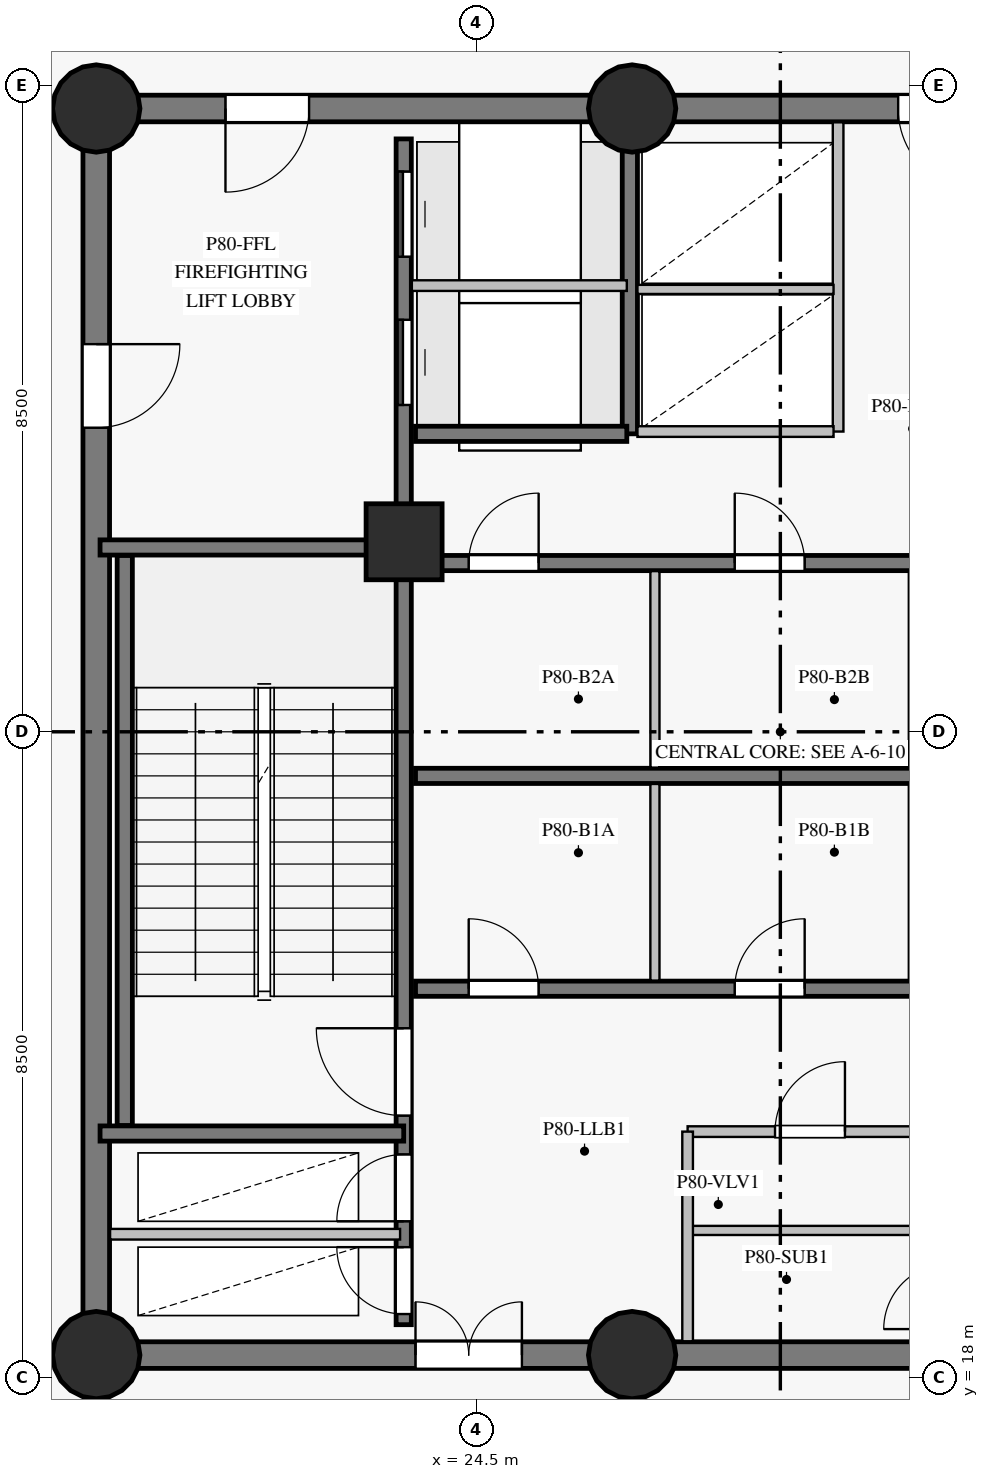
"""IFC4 building model, lengths in metres.
Left out: names, types, materials, properties, quantities, classifications, styles, units other than length and angle.
Written with IfcOpenShell. Run it as: python <this file> out.ifc"""

import sys

from ifc_helpers import new_model, si_unit, direction, frame, frame_2d, origin, origin_with_axes, origin_2d, place, context, subcontext, project, spatial, rectangle, circle, extrude, source, transform, mapped, element, fill, save


model = new_model("IFC4")
c1 = context("Model", 3, precision=1e-05, world=origin(), true_north=direction((0.0, 1.0)))
c2 = subcontext(c1, "Body", "Model", "MODEL_VIEW")
j1 = project(units=[si_unit("LENGTHUNIT", "METRE"), si_unit("PLANEANGLEUNIT", "RADIAN")], contexts=[c1])
p1 = place(None, origin())
s1 = spatial("IfcSite", under=j1, at=p1, CompositionType="ELEMENT")
p2 = place(p1, origin())
s2 = spatial("IfcBuilding", under=s1, at=p2, CompositionType="ELEMENT")
p3 = place(p2, frame((0.0, 0.0, 268.75)))
s3 = spatial("IfcBuildingStorey", under=s2, at=p3, CompositionType="ELEMENT", Elevation=268.75)
p4 = place(p3, frame((19.5, 18.3, 0.0), z_axis=(0.0, 0.0, 1.0), x_axis=(1.0, 0.0, 0.0)))
e1 = element("IfcWall", 1, at=p4, inside=s3, PredefinedType="SHEAR", context=c2, shape_type="SweptSolid", body=[
    extrude(rectangle(XDim=7.05, YDim=0.35, at=frame_2d((3.525, 0.0))), origin(), (0.0, 0.0, 1.0), 4.375),
])
p5 = place(p4, frame((4.2, 0.0, 0.0)))
e2 = element("IfcOpeningElement", 2, at=p5, cuts=e1, PredefinedType="OPENING", context=c2, shape_type="SweptSolid", body=[
    extrude(rectangle(XDim=1.4, YDim=2.2, at=frame_2d((0.7, 1.1))), frame((0.0, 0.185, 0.0), z_axis=(0.0, -1.0, 0.0), x_axis=(1.0, 0.0, 0.0)), (0.0, 0.0, 1.0), 0.37),
])
p6 = place(p3, frame((26.55, 18.3, 0.0), z_axis=(0.0, 0.0, 1.0), x_axis=(1.0, 0.0, 0.0)))
e3 = element("IfcWall", 3, at=p6, inside=s3, PredefinedType="SHEAR", context=c2, shape_type="SweptSolid", body=[
    extrude(rectangle(XDim=10.95, YDim=0.35, at=frame_2d((5.475, 0.0))), origin(), (0.0, 0.0, 1.0), 4.375),
])
p7 = place(p6, frame((4.55, 0.0, 0.0)))
e4 = element("IfcOpeningElement", 4, at=p7, cuts=e3, PredefinedType="OPENING", context=c2, shape_type="SweptSolid", body=[
    extrude(rectangle(XDim=1.4, YDim=2.2, at=frame_2d((0.7, 1.1))), frame((0.0, 0.185, 0.0), z_axis=(0.0, -1.0, 0.0), x_axis=(1.0, 0.0, 0.0)), (0.0, 0.0, 1.0), 0.37),
])
p8 = place(p3, frame((37.5, 34.7, 0.0), z_axis=(0.0, 0.0, 1.0), x_axis=(-1.0, 0.0, 0.0)))
e5 = element("IfcWall", 5, at=p8, inside=s3, PredefinedType="SHEAR", context=c2, shape_type="SweptSolid", body=[
    extrude(rectangle(XDim=10.95, YDim=0.35, at=frame_2d((5.475, 0.0))), origin(), (0.0, 0.0, 1.0), 4.375),
])
p9 = place(p8, frame((2.15, 0.0, 0.0)))
e6 = element("IfcOpeningElement", 6, at=p9, cuts=e5, PredefinedType="OPENING", context=c2, shape_type="SweptSolid", body=[
    extrude(rectangle(XDim=1.2, YDim=2.15, at=frame_2d((0.6, 1.075))), frame((0.0, 0.185, 0.0), z_axis=(0.0, -1.0, 0.0), x_axis=(1.0, 0.0, 0.0)), (0.0, 0.0, 1.0), 0.37),
])
p10 = place(p8, frame((6.35, 0.0, 0.0)))
e7 = element("IfcOpeningElement", 7, at=p10, cuts=e5, PredefinedType="OPENING", context=c2, shape_type="SweptSolid", body=[
    extrude(rectangle(XDim=1.1, YDim=2.15, at=frame_2d((0.55, 1.075))), frame((0.0, 0.185, 0.0), z_axis=(0.0, -1.0, 0.0), x_axis=(1.0, 0.0, 0.0)), (0.0, 0.0, 1.0), 0.37),
])
p11 = place(p3, frame((26.55, 34.7, 0.0), z_axis=(0.0, 0.0, 1.0), x_axis=(-1.0, 0.0, 0.0)))
e8 = element("IfcWall", 8, at=p11, inside=s3, PredefinedType="SHEAR", context=c2, shape_type="SweptSolid", body=[
    extrude(rectangle(XDim=7.05, YDim=0.35, at=frame_2d((3.525, 0.0))), origin(), (0.0, 0.0, 1.0), 4.375),
])
p12 = place(p11, frame((4.25, 0.0, 0.0)))
e9 = element("IfcOpeningElement", 9, at=p12, cuts=e8, PredefinedType="OPENING", context=c2, shape_type="SweptSolid", body=[
    extrude(rectangle(XDim=1.1, YDim=2.15, at=frame_2d((0.55, 1.075))), frame((0.0, 0.185, 0.0), z_axis=(0.0, -1.0, 0.0), x_axis=(1.0, 0.0, 0.0)), (0.0, 0.0, 1.0), 0.37),
])
p13 = place(p3, frame((19.5, 34.7, 0.0), z_axis=(0.0, 0.0, 1.0), x_axis=(0.0, -1.0, 0.0)))
e10 = element("IfcWall", 10, at=p13, inside=s3, PredefinedType="SHEAR", context=c2, shape_type="SweptSolid", body=[
    extrude(rectangle(XDim=16.4, YDim=0.35, at=frame_2d((8.2, 0.0))), origin(), (0.0, 0.0, 1.0), 4.375),
])
p14 = place(p13, frame((3.1, 0.0, 0.0)))
e11 = element("IfcOpeningElement", 11, at=p14, cuts=e10, PredefinedType="OPENING", context=c2, shape_type="SweptSolid", body=[
    extrude(rectangle(XDim=1.1, YDim=2.15, at=frame_2d((0.55, 1.075))), frame((0.0, 0.185, 0.0), z_axis=(0.0, -1.0, 0.0), x_axis=(1.0, 0.0, 0.0)), (0.0, 0.0, 1.0), 0.37),
])
m1 = source(origin_with_axes(), c2, "Body", "SweptSolid", [
    extrude(circle(Radius=0.575, at=origin_2d()), origin(), (0.0, 0.0, 1.0), 4.65),
])
for number, where, z_axis, x_axis in (
    (12, (19.5, 18.3, 0.0), (0.0, 0.0, 1.0), (1.0, 0.0, 0.0)),
    (13, (26.55, 18.3, 0.0), (0.0, 0.0, 1.0), (1.0, 0.0, 0.0)),
    (14, (19.5, 34.7, 0.0), (0.0, 0.0, 1.0), (1.0, 0.0, 0.0)),
    (15, (26.55, 34.7, 0.0), (0.0, 0.0, 1.0), (1.0, 0.0, 0.0)),
):
    element("IfcColumn", number, at=place(p3, frame(where, z_axis=z_axis, x_axis=x_axis)), inside=s3, PredefinedType="COLUMN", context=c2, shape_type="MappedRepresentation", body=[
        mapped(m1, transform((0.0, 0.0, 0.0), scale=1.0)),
    ])
m2 = source(origin_with_axes(), c2, "Body", "SweptSolid", [
    extrude(rectangle(XDim=1.0, YDim=1.0, at=origin_2d()), origin(), (0.0, 0.0, 1.0), 4.65),
])
p15 = place(p3, frame((23.55, 29.0, 0.0), z_axis=(0.0, 0.0, 1.0), x_axis=(1.0, 0.0, 0.0)))
e16 = element("IfcColumn", 16, at=p15, inside=s3, PredefinedType="COLUMN", context=c2, shape_type="MappedRepresentation", body=[
    mapped(m2, transform((0.0, 0.0, 0.0), scale=1.0)),
])
p16 = place(p3, frame((23.545, 18.7, 0.0), z_axis=(0.0, 0.0, 1.0), x_axis=(0.0, 1.0, 0.0)))
e17 = element("IfcWall", 17, at=p16, inside=s3, PredefinedType="SHEAR", context=c2, shape_type="SweptSolid", body=[
    extrude(rectangle(XDim=15.6, YDim=0.2, at=frame_2d((7.8, 0.0))), origin(), (0.0, 0.0, 1.0), 4.375),
])
p17 = place(p16, frame((2.75, 0.0, 0.0)))
e18 = element("IfcOpeningElement", 18, at=p17, cuts=e17, PredefinedType="OPENING", context=c2, shape_type="SweptSolid", body=[
    extrude(rectangle(XDim=1.15, YDim=2.15, at=frame_2d((0.575, 1.075))), frame((0.0, 0.11, 0.0), z_axis=(0.0, -1.0, 0.0), x_axis=(1.0, 0.0, 0.0)), (0.0, 0.0, 1.0), 0.22),
])
p18 = place(p16, frame((0.14, 0.0, 0.0)))
e19 = element("IfcOpeningElement", 19, at=p18, cuts=e17, PredefinedType="OPENING", context=c2, shape_type="SweptSolid", body=[
    extrude(rectangle(XDim=0.88, YDim=2.1, at=frame_2d((0.44, 1.05))), frame((0.0, 0.11, 0.0), z_axis=(0.0, -1.0, 0.0), x_axis=(1.0, 0.0, 0.0)), (0.0, 0.0, 1.0), 0.22),
])
p19 = place(p16, frame((1.36, 0.0, 0.0)))
e20 = element("IfcOpeningElement", 20, at=p19, cuts=e17, PredefinedType="OPENING", context=c2, shape_type="SweptSolid", body=[
    extrude(rectangle(XDim=0.88, YDim=2.1, at=frame_2d((0.44, 1.05))), frame((0.0, 0.11, 0.0), z_axis=(0.0, -1.0, 0.0), x_axis=(1.0, 0.0, 0.0)), (0.0, 0.0, 1.0), 0.22),
])
p20 = place(p16, frame((12.1, 0.0, 0.0)))
e21 = element("IfcOpeningElement", 21, at=p20, cuts=e17, PredefinedType="OPENING", context=c2, shape_type="SweptSolid", body=[
    extrude(rectangle(XDim=1.12, YDim=2.15, at=frame_2d((0.56, 1.075))), frame((0.0, 0.11, 0.0), z_axis=(0.0, -1.0, 0.0), x_axis=(1.0, 0.0, 0.0)), (0.0, 0.0, 1.0), 0.22),
])
p21 = place(p16, frame((14.05, 0.0, 0.0)))
e22 = element("IfcOpeningElement", 22, at=p21, cuts=e17, PredefinedType="OPENING", context=c2, shape_type="SweptSolid", body=[
    extrude(rectangle(XDim=1.12, YDim=2.15, at=frame_2d((0.56, 1.075))), frame((0.0, 0.11, 0.0), z_axis=(0.0, -1.0, 0.0), x_axis=(1.0, 0.0, 0.0)), (0.0, 0.0, 1.0), 0.22),
])
p22 = place(p3, frame((23.7, 23.12, 0.0), z_axis=(0.0, 0.0, 1.0), x_axis=(1.0, 0.0, 0.0)))
e23 = element("IfcWall", 23, at=p22, inside=s3, PredefinedType="SHEAR", context=c2, shape_type="SweptSolid", body=[
    extrude(rectangle(XDim=9.6, YDim=0.2, at=frame_2d((4.8, 0.0))), origin(), (0.0, 0.0, 1.0), 4.375),
])
p23 = place(p22, frame((0.7, 0.0, 0.0)))
e24 = element("IfcOpeningElement", 24, at=p23, cuts=e23, PredefinedType="OPENING", context=c2, shape_type="SweptSolid", body=[
    extrude(rectangle(XDim=0.92, YDim=2.1, at=frame_2d((0.46, 1.05))), frame((0.0, 0.11, 0.0), z_axis=(0.0, -1.0, 0.0), x_axis=(1.0, 0.0, 0.0)), (0.0, 0.0, 1.0), 0.22),
])
p24 = place(p22, frame((4.2, 0.0, 0.0)))
e25 = element("IfcOpeningElement", 25, at=p24, cuts=e23, PredefinedType="OPENING", context=c2, shape_type="SweptSolid", body=[
    extrude(rectangle(XDim=0.92, YDim=2.1, at=frame_2d((0.46, 1.05))), frame((0.0, 0.11, 0.0), z_axis=(0.0, -1.0, 0.0), x_axis=(1.0, 0.0, 0.0)), (0.0, 0.0, 1.0), 0.22),
])
p25 = place(p22, frame((7.45, 0.0, 0.0)))
e26 = element("IfcOpeningElement", 26, at=p25, cuts=e23, PredefinedType="OPENING", context=c2, shape_type="SweptSolid", body=[
    extrude(rectangle(XDim=0.92, YDim=2.1, at=frame_2d((0.46, 1.05))), frame((0.0, 0.11, 0.0), z_axis=(0.0, -1.0, 0.0), x_axis=(1.0, 0.0, 0.0)), (0.0, 0.0, 1.0), 0.22),
])
p26 = place(p3, frame((23.7, 25.92, 0.0), z_axis=(0.0, 0.0, 1.0), x_axis=(1.0, 0.0, 0.0)))
e27 = element("IfcWall", 27, at=p26, inside=s3, PredefinedType="SHEAR", context=c2, shape_type="SweptSolid", body=[
    extrude(rectangle(XDim=9.6, YDim=0.2, at=frame_2d((4.8, 0.0))), origin(), (0.0, 0.0, 1.0), 4.375),
])
p27 = place(p3, frame((23.7, 28.72, 0.0), z_axis=(0.0, 0.0, 1.0), x_axis=(1.0, 0.0, 0.0)))
e28 = element("IfcWall", 28, at=p27, inside=s3, PredefinedType="SHEAR", context=c2, shape_type="SweptSolid", body=[
    extrude(rectangle(XDim=9.6, YDim=0.2, at=frame_2d((4.8, 0.0))), origin(), (0.0, 0.0, 1.0), 4.375),
])
p28 = place(p27, frame((0.7, 0.0, 0.0)))
e29 = element("IfcOpeningElement", 29, at=p28, cuts=e28, PredefinedType="OPENING", context=c2, shape_type="SweptSolid", body=[
    extrude(rectangle(XDim=0.92, YDim=2.1, at=frame_2d((0.46, 1.05))), frame((0.0, 0.11, 0.0), z_axis=(0.0, -1.0, 0.0), x_axis=(1.0, 0.0, 0.0)), (0.0, 0.0, 1.0), 0.22),
])
p29 = place(p27, frame((4.2, 0.0, 0.0)))
e30 = element("IfcOpeningElement", 30, at=p29, cuts=e28, PredefinedType="OPENING", context=c2, shape_type="SweptSolid", body=[
    extrude(rectangle(XDim=0.92, YDim=2.1, at=frame_2d((0.46, 1.05))), frame((0.0, 0.11, 0.0), z_axis=(0.0, -1.0, 0.0), x_axis=(1.0, 0.0, 0.0)), (0.0, 0.0, 1.0), 0.22),
])
p30 = place(p27, frame((7.45, 0.0, 0.0)))
e31 = element("IfcOpeningElement", 31, at=p30, cuts=e28, PredefinedType="OPENING", context=c2, shape_type="SweptSolid", body=[
    extrude(rectangle(XDim=0.92, YDim=2.1, at=frame_2d((0.46, 1.05))), frame((0.0, 0.11, 0.0), z_axis=(0.0, -1.0, 0.0), x_axis=(1.0, 0.0, 0.0)), (0.0, 0.0, 1.0), 0.22),
])
p31 = place(p3, frame((19.875, 21.32, 0.0), z_axis=(0.0, 0.0, 1.0), x_axis=(0.0, 1.0, 0.0)))
e32 = element("IfcWall", 32, at=p31, inside=s3, PredefinedType="SHEAR", context=c2, shape_type="SweptSolid", body=[
    extrude(rectangle(XDim=7.5, YDim=0.2, at=frame_2d((3.75, 0.0))), origin(), (0.0, 0.0, 1.0), 4.375),
])
for number, where, z_axis, x_axis in (
    (33, (19.55, 21.215, 0.0), (0.0, 0.0, 1.0), (1.0, 0.0, 0.0)),
    (34, (19.55, 28.925, 0.0), (0.0, 0.0, 1.0), (1.0, 0.0, 0.0)),
):
    element("IfcWall", number, at=place(p3, frame(where, z_axis=z_axis, x_axis=x_axis)), inside=s3, PredefinedType="SHEAR", context=c2, shape_type="SweptSolid", body=[
        extrude(rectangle(XDim=3.995, YDim=0.2, at=frame_2d((1.998, 0.0))), origin(), (0.0, 0.0, 1.0), 4.375),
    ])
p32 = place(p3, frame((26.52, 30.42, 0.0), z_axis=(0.0, 0.0, 1.0), x_axis=(0.0, 1.0, 0.0)))
e35 = element("IfcWall", 35, at=p32, inside=s3, PredefinedType="SHEAR", context=c2, shape_type="SweptSolid", body=[
    extrude(rectangle(XDim=3.86, YDim=0.2, at=frame_2d((1.93, 0.0))), origin(), (0.0, 0.0, 1.0), 4.375),
])
p33 = place(p3, frame((23.7, 30.42, 0.0), z_axis=(0.0, 0.0, 1.0), x_axis=(1.0, 0.0, 0.0)))
e36 = element("IfcWall", 36, at=p33, inside=s3, PredefinedType="SHEAR", context=c2, shape_type="SweptSolid", body=[
    extrude(rectangle(XDim=2.78, YDim=0.2, at=frame_2d((1.39, 0.0))), origin(), (0.0, 0.0, 1.0), 4.375),
])
p34 = place(p3, frame((29.26, 30.45, 0.0), z_axis=(0.0, 0.0, 1.0), x_axis=(0.0, 1.0, 0.0)))
e37 = element("IfcWall", 37, at=p34, inside=s3, PredefinedType="PARTITIONING", context=c2, shape_type="SweptSolid", body=[
    extrude(rectangle(XDim=4.068, YDim=0.14, at=frame_2d((2.034, 0.0))), origin(), (0.0, 0.0, 1.0), 4.375),
])
p35 = place(p3, frame((19.682, 19.89, 0.0), z_axis=(0.0, 0.0, 1.0), x_axis=(1.0, 0.0, 0.0)))
e38 = element("IfcWall", 38, at=p35, inside=s3, PredefinedType="PARTITIONING", context=c2, shape_type="SweptSolid", body=[
    extrude(rectangle(XDim=3.815, YDim=0.14, at=frame_2d((1.908, 0.0))), origin(), (0.0, 0.0, 1.0), 4.375),
])
p36 = place(p3, frame((27.28, 21.24, 0.0), z_axis=(0.0, 0.0, 1.0), x_axis=(1.0, 0.0, 0.0)))
e39 = element("IfcWall", 39, at=p36, inside=s3, PredefinedType="PARTITIONING", context=c2, shape_type="SweptSolid", body=[
    extrude(rectangle(XDim=3.44, YDim=0.14, at=frame_2d((1.72, 0.0))), origin(), (0.0, 0.0, 1.0), 4.375),
])
p37 = place(p36, frame((1.15, 0.0, 0.0)))
e40 = element("IfcOpeningElement", 40, at=p37, cuts=e39, PredefinedType="OPENING", context=c2, shape_type="SweptSolid", body=[
    extrude(rectangle(XDim=0.92, YDim=2.1, at=frame_2d((0.46, 1.05))), frame((0.0, 0.08, 0.0), z_axis=(0.0, -1.0, 0.0), x_axis=(1.0, 0.0, 0.0)), (0.0, 0.0, 1.0), 0.16),
])
p38 = place(p3, frame((27.28, 19.94, 0.0), z_axis=(0.0, 0.0, 1.0), x_axis=(1.0, 0.0, 0.0)))
e41 = element("IfcWall", 41, at=p38, inside=s3, PredefinedType="PARTITIONING", context=c2, shape_type="SweptSolid", body=[
    extrude(rectangle(XDim=3.44, YDim=0.12, at=frame_2d((1.72, 0.0))), origin(), (0.0, 0.0, 1.0), 4.375),
])
p39 = place(p3, frame((23.652, 32.37, 0.0), z_axis=(0.0, 0.0, 1.0), x_axis=(1.0, 0.0, 0.0)))
e42 = element("IfcWall", 42, at=p39, inside=s3, PredefinedType="PARTITIONING", context=c2, shape_type="SweptSolid", body=[
    extrude(rectangle(XDim=2.828, YDim=0.14, at=frame_2d((1.414, 0.0))), origin(), (0.0, 0.0, 1.0), 4.375),
])
p40 = place(p3, frame((27.28, 18.482, 0.0), z_axis=(0.0, 0.0, 1.0), x_axis=(0.0, 1.0, 0.0)))
e43 = element("IfcWall", 43, at=p40, inside=s3, PredefinedType="PARTITIONING", context=c2, shape_type="SweptSolid", body=[
    extrude(rectangle(XDim=2.758, YDim=0.14, at=frame_2d((1.379, 0.0))), origin(), (0.0, 0.0, 1.0), 4.375),
])
p41 = place(p3, frame((26.62, 30.45, 0.0), z_axis=(0.0, 0.0, 1.0), x_axis=(1.0, 0.0, 0.0)))
e44 = element("IfcWall", 44, at=p41, inside=s3, PredefinedType="PARTITIONING", context=c2, shape_type="SweptSolid", body=[
    extrude(rectangle(XDim=2.58, YDim=0.14, at=frame_2d((1.29, 0.0))), origin(), (0.0, 0.0, 1.0), 4.375),
])
p42 = place(p3, frame((26.62, 32.32, 0.0), z_axis=(0.0, 0.0, 1.0), x_axis=(1.0, 0.0, 0.0)))
e45 = element("IfcWall", 45, at=p42, inside=s3, PredefinedType="PARTITIONING", context=c2, shape_type="SweptSolid", body=[
    extrude(rectangle(XDim=2.58, YDim=0.12, at=frame_2d((1.29, 0.0))), origin(), (0.0, 0.0, 1.0), 4.375),
])
for number, where, z_axis, x_axis in (
    (46, (26.85, 23.227, 0.0), (0.0, 0.0, 1.0), (0.0, 1.0, 0.0)),
    (47, (30.25, 23.227, 0.0), (0.0, 0.0, 1.0), (0.0, 1.0, 0.0)),
    (48, (26.85, 26.027, 0.0), (0.0, 0.0, 1.0), (0.0, 1.0, 0.0)),
    (49, (30.25, 26.027, 0.0), (0.0, 0.0, 1.0), (0.0, 1.0, 0.0)),
):
    element("IfcWall", number, at=place(p3, frame(where, z_axis=z_axis, x_axis=x_axis)), inside=s3, PredefinedType="PARTITIONING", context=c2, shape_type="SweptSolid", body=[
        extrude(rectangle(XDim=2.587, YDim=0.12, at=frame_2d((1.293, 0.0))), origin(), (0.0, 0.0, 1.0), 4.375),
    ])
m3 = source(origin_with_axes(), c2, "Body", "SweptSolid", [
    extrude(rectangle(XDim=1.15, YDim=2.15, at=frame_2d((0.575, 1.075))), frame((0.0, 0.025, 0.0), z_axis=(0.0, -1.0, 0.0), x_axis=(1.0, 0.0, 0.0)), (0.0, 0.0, 1.0), 0.05),
])
p43 = place(p17, origin())
e50 = element("IfcDoor", 50, at=p43, inside=s3, OperationType="SINGLE_SWING_RIGHT", PredefinedType="DOOR", context=c2, shape_type="MappedRepresentation", body=[
    mapped(m3, transform((0.0, 0.0, 0.0), scale=1.0)),
])
fill(e18, e50)
m4 = source(origin_with_axes(), c2, "Body", "SweptSolid", [
    extrude(rectangle(XDim=1.1, YDim=2.15, at=frame_2d((0.55, 1.075))), frame((0.0, 0.025, 0.0), z_axis=(0.0, -1.0, 0.0), x_axis=(1.0, 0.0, 0.0)), (0.0, 0.0, 1.0), 0.05),
])
p44 = place(p12, origin())
e51 = element("IfcDoor", 51, at=p44, inside=s3, OperationType="SINGLE_SWING_RIGHT", PredefinedType="DOOR", context=c2, shape_type="MappedRepresentation", body=[
    mapped(m4, transform((0.0, 0.0, 0.0), scale=1.0)),
])
fill(e9, e51)
p45 = place(p14, origin())
e52 = element("IfcDoor", 52, at=p45, inside=s3, OperationType="SINGLE_SWING_LEFT", PredefinedType="DOOR", context=c2, shape_type="MappedRepresentation", body=[
    mapped(m4, transform((0.0, 0.0, 0.0), scale=1.0)),
])
fill(e11, e52)
m5 = source(origin_with_axes(), c2, "Body", "SweptSolid", [
    extrude(rectangle(XDim=0.88, YDim=2.1, at=frame_2d((0.44, 1.05))), frame((0.0, 0.025, 0.0), z_axis=(0.0, -1.0, 0.0), x_axis=(1.0, 0.0, 0.0)), (0.0, 0.0, 1.0), 0.05),
])
p46 = place(p18, origin())
e53 = element("IfcDoor", 53, at=p46, inside=s3, OperationType="SINGLE_SWING_RIGHT", PredefinedType="DOOR", context=c2, shape_type="MappedRepresentation", body=[
    mapped(m5, transform((0.0, 0.0, 0.0), scale=1.0)),
])
fill(e19, e53)
p47 = place(p19, origin())
e54 = element("IfcDoor", 54, at=p47, inside=s3, OperationType="SINGLE_SWING_LEFT", PredefinedType="DOOR", context=c2, shape_type="MappedRepresentation", body=[
    mapped(m5, transform((0.0, 0.0, 0.0), scale=1.0)),
])
fill(e20, e54)
m6 = source(origin_with_axes(), c2, "Body", "SweptSolid", [
    extrude(rectangle(XDim=1.4, YDim=2.2, at=frame_2d((0.7, 1.1))), frame((0.0, 0.025, 0.0), z_axis=(0.0, -1.0, 0.0), x_axis=(1.0, 0.0, 0.0)), (0.0, 0.0, 1.0), 0.05),
])
p48 = place(p5, origin())
e55 = element("IfcDoor", 55, at=p48, inside=s3, OperationType="DOUBLE_DOOR_SINGLE_SWING", PredefinedType="DOOR", context=c2, shape_type="MappedRepresentation", body=[
    mapped(m6, transform((0.0, 0.0, 0.0), scale=1.0)),
])
fill(e2, e55)
m7 = source(origin_with_axes(), c2, "Body", "SweptSolid", [
    extrude(rectangle(XDim=0.92, YDim=2.1, at=frame_2d((0.46, 1.05))), frame((0.0, 0.025, 0.0), z_axis=(0.0, -1.0, 0.0), x_axis=(1.0, 0.0, 0.0)), (0.0, 0.0, 1.0), 0.05),
])
p49 = place(p37, origin())
e56 = element("IfcDoor", 56, at=p49, inside=s3, OperationType="SINGLE_SWING_RIGHT", PredefinedType="DOOR", context=c2, shape_type="MappedRepresentation", body=[
    mapped(m7, transform((0.0, 0.0, 0.0), scale=1.0)),
])
fill(e40, e56)
p50 = place(p23, origin())
e57 = element("IfcDoor", 57, at=p50, inside=s3, OperationType="SINGLE_SWING_LEFT", PredefinedType="DOOR", context=c2, shape_type="MappedRepresentation", body=[
    mapped(m7, transform((0.0, 0.0, 0.0), scale=1.0)),
])
fill(e24, e57)
p51 = place(p24, origin())
e58 = element("IfcDoor", 58, at=p51, inside=s3, OperationType="SINGLE_SWING_RIGHT", PredefinedType="DOOR", context=c2, shape_type="MappedRepresentation", body=[
    mapped(m7, transform((0.0, 0.0, 0.0), scale=1.0)),
])
fill(e25, e58)
p52 = place(p28, origin())
e59 = element("IfcDoor", 59, at=p52, inside=s3, OperationType="SINGLE_SWING_RIGHT", PredefinedType="DOOR", context=c2, shape_type="MappedRepresentation", body=[
    mapped(m7, transform((0.0, 0.0, 0.0), scale=1.0)),
])
fill(e29, e59)
p53 = place(p29, origin())
e60 = element("IfcDoor", 60, at=p53, inside=s3, OperationType="SINGLE_SWING_LEFT", PredefinedType="DOOR", context=c2, shape_type="MappedRepresentation", body=[
    mapped(m7, transform((0.0, 0.0, 0.0), scale=1.0)),
])
fill(e30, e60)
p54 = place(p10, origin())
e61 = element("IfcDoor", 61, at=p54, inside=s3, OperationType="SINGLE_SWING_LEFT", PredefinedType="DOOR", context=c2, shape_type="MappedRepresentation", body=[
    mapped(m4, transform((0.0, 0.0, 0.0), scale=1.0)),
])
fill(e7, e61)
m8 = source(origin_with_axes(), c2, "Body", "SweptSolid", [
    extrude(rectangle(XDim=1.12, YDim=2.15, at=frame_2d((0.56, 1.075))), frame((0.0, 0.025, 0.0), z_axis=(0.0, -1.0, 0.0), x_axis=(1.0, 0.0, 0.0)), (0.0, 0.0, 1.0), 0.05),
])
p55 = place(p20, origin())
e62 = element("IfcDoor", 62, at=p55, inside=s3, OperationType="SLIDING_TO_LEFT", PredefinedType="DOOR", context=c2, shape_type="MappedRepresentation", body=[
    mapped(m8, transform((0.0, 0.0, 0.0), scale=1.0)),
])
fill(e21, e62)
p56 = place(p21, origin())
e63 = element("IfcDoor", 63, at=p56, inside=s3, OperationType="SLIDING_TO_RIGHT", PredefinedType="DOOR", context=c2, shape_type="MappedRepresentation", body=[
    mapped(m8, transform((0.0, 0.0, 0.0), scale=1.0)),
])
fill(e22, e63)
save(model, sys.argv[1])
